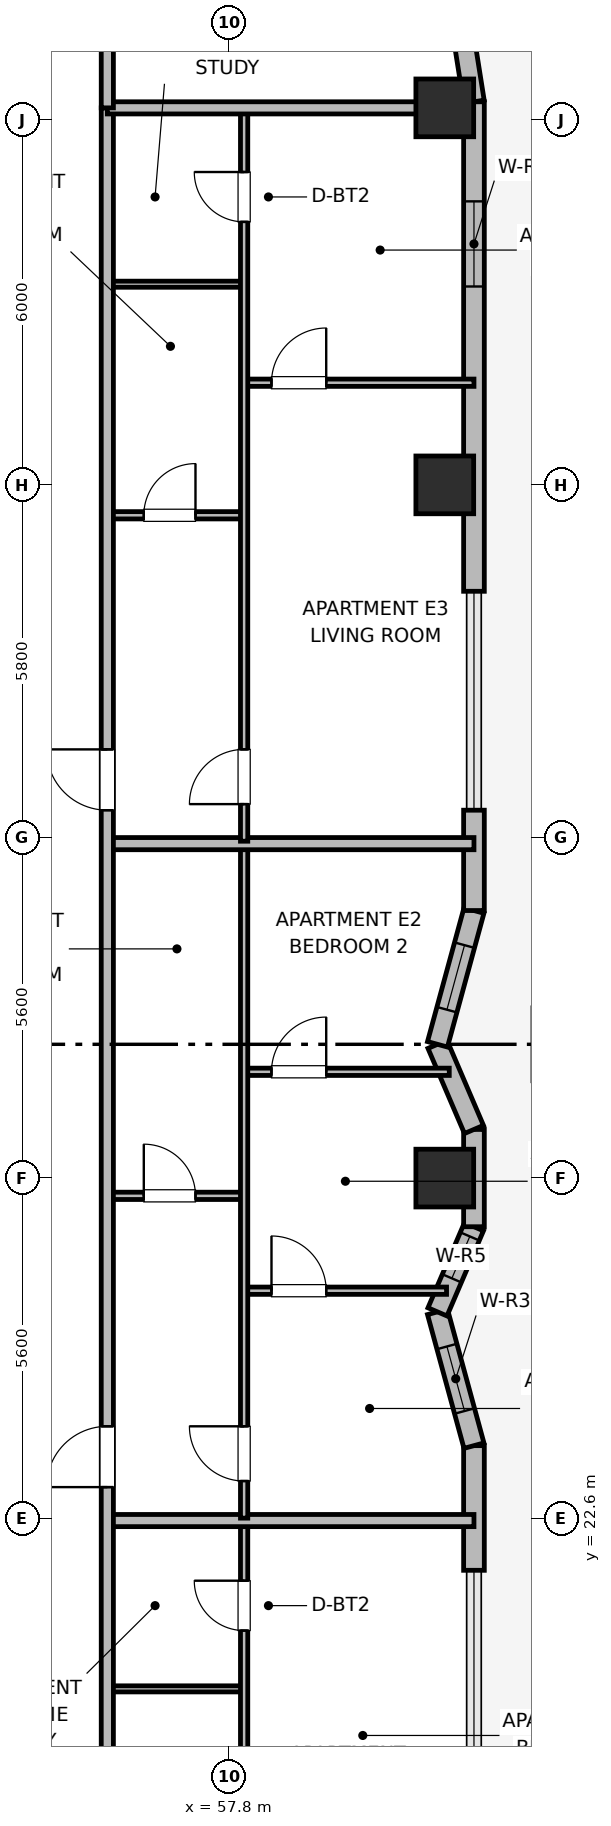
"""IFC4 building model, lengths in metres.
Left out: names, types, materials, properties, quantities, classifications, styles, units other than length and angle.
Written with IfcOpenShell. Run it as: python <this file> out.ifc"""

import sys

from ifc_helpers import new_model, si_unit, direction, frame, frame_2d, origin, origin_2d, place, context, subcontext, project, spatial, rectangle, extrude, element, fill, save


model = new_model("IFC4")
c1 = context("Model", 3, precision=1e-05, world=origin(), true_north=direction((0.0, 1.0)))
c2 = subcontext(c1, "Body", "Model", "MODEL_VIEW")
j1 = project(units=[si_unit("LENGTHUNIT", "METRE"), si_unit("PLANEANGLEUNIT", "RADIAN")], contexts=[c1])
p1 = place(None, origin())
s1 = spatial("IfcSite", under=j1, at=p1, CompositionType="ELEMENT")
p2 = place(p1, origin())
s2 = spatial("IfcBuilding", under=s1, at=p2, CompositionType="ELEMENT")
p3 = place(p2, frame((0.0, 0.0, 143.6)))
s3 = spatial("IfcBuildingStorey", under=s2, at=p3, CompositionType="ELEMENT", Elevation=143.6)
for number, where, z_axis, x_axis in (
    (1, (61.35, 28.2, 0.0), (0.0, 0.0, 1.0), (1.0, 0.0, 0.0)),
    (2, (61.35, 39.6, 0.0), (0.0, 0.0, 1.0), (1.0, 0.0, 0.0)),
    (3, (61.35, 45.8, 0.0), (0.0, 0.0, 1.0), (1.0, 0.0, 0.0)),
):
    element("IfcColumn", number, at=place(p3, frame(where, z_axis=z_axis, x_axis=x_axis)), inside=s3, PredefinedType="COLUMN", context=c2, shape_type="SweptSolid", body=[
        extrude(rectangle(XDim=0.95, YDim=0.95, at=origin_2d()), origin(), (0.0, 0.0, 1.0), 4.2),
    ])
p4 = place(p3, frame((61.83, 21.75, 0.0), z_axis=(0.0, 0.0, 1.0), x_axis=(0.0, 1.0, 0.0)))
e4 = element("IfcWall", 4, at=p4, inside=s3, PredefinedType="SOLIDWALL", context=c2, shape_type="SweptSolid", body=[
    extrude(rectangle(XDim=2.05, YDim=0.34, at=frame_2d((1.025, 0.0))), origin(), (0.0, 0.0, 1.0), 3.22),
])
p5 = place(p3, frame((61.83, 23.8, 0.0), z_axis=(0.0, 0.0, 1.0), x_axis=(-0.263162701705, 0.964751466665, 0.0)))
e5 = element("IfcWall", 5, at=p5, inside=s3, PredefinedType="SOLIDWALL", context=c2, shape_type="SweptSolid", body=[
    extrude(rectangle(XDim=2.28, YDim=0.34, at=frame_2d((1.14, 0.0))), origin(), (0.0, 0.0, 1.0), 3.22),
])
p6 = place(p5, frame((0.59, 0.0, 0.95)))
e6 = element("IfcOpeningElement", 6, at=p6, cuts=e5, PredefinedType="OPENING", context=c2, shape_type="SweptSolid", body=[
    extrude(rectangle(XDim=1.1, YDim=1.65, at=frame_2d((0.55, 0.825))), frame((0.0, 0.18, 0.0), z_axis=(0.0, -1.0, 0.0), x_axis=(1.0, 0.0, 0.0)), (0.0, 0.0, 1.0), 0.36),
])
p7 = place(p3, frame((61.23, 26.0, 0.0), z_axis=(0.0, 0.0, 1.0), x_axis=(0.39399667932, 0.919111862988, 0.0)))
e7 = element("IfcWall", 7, at=p7, inside=s3, PredefinedType="SOLIDWALL", context=c2, shape_type="SweptSolid", body=[
    extrude(rectangle(XDim=1.523, YDim=0.34, at=frame_2d((0.762, 0.0))), origin(), (0.0, 0.0, 1.0), 3.22),
])
p8 = place(p7, frame((0.6, 0.0, 0.95)))
e8 = element("IfcOpeningElement", 8, at=p8, cuts=e7, PredefinedType="OPENING", context=c2, shape_type="SweptSolid", body=[
    extrude(rectangle(XDim=0.75, YDim=1.65, at=frame_2d((0.375, 0.825))), frame((0.0, 0.18, 0.0), z_axis=(0.0, -1.0, 0.0), x_axis=(1.0, 0.0, 0.0)), (0.0, 0.0, 1.0), 0.36),
])
p9 = place(p3, frame((61.83, 27.4, 0.0), z_axis=(0.0, 0.0, 1.0), x_axis=(0.0, 1.0, 0.0)))
e9 = element("IfcWall", 9, at=p9, inside=s3, PredefinedType="SOLIDWALL", context=c2, shape_type="SweptSolid", body=[
    extrude(rectangle(XDim=1.6, YDim=0.34, at=frame_2d((0.8, 0.0))), origin(), (0.0, 0.0, 1.0), 3.22),
])
p10 = place(p3, frame((61.83, 29.0, 0.0), z_axis=(0.0, 0.0, 1.0), x_axis=(-0.39399667932, 0.919111862988, 0.0)))
e10 = element("IfcWall", 10, at=p10, inside=s3, PredefinedType="SOLIDWALL", context=c2, shape_type="SweptSolid", body=[
    extrude(rectangle(XDim=1.523, YDim=0.34, at=frame_2d((0.762, 0.0))), origin(), (0.0, 0.0, 1.0), 3.22),
])
p11 = place(p3, frame((61.23, 30.4, 0.0), z_axis=(0.0, 0.0, 1.0), x_axis=(0.263135522356, 0.964758880174, 0.0)))
e11 = element("IfcWall", 11, at=p11, inside=s3, PredefinedType="SOLIDWALL", context=c2, shape_type="SweptSolid", body=[
    extrude(rectangle(XDim=2.281, YDim=0.34, at=frame_2d((1.14, 0.0))), origin(), (0.0, 0.0, 1.0), 3.22),
])
p12 = place(p11, frame((0.59, 0.0, 0.95)))
e12 = element("IfcOpeningElement", 12, at=p12, cuts=e11, PredefinedType="OPENING", context=c2, shape_type="SweptSolid", body=[
    extrude(rectangle(XDim=1.1, YDim=1.65, at=frame_2d((0.55, 0.825))), frame((0.0, 0.18, 0.0), z_axis=(0.0, -1.0, 0.0), x_axis=(1.0, 0.0, 0.0)), (0.0, 0.0, 1.0), 0.36),
])
p13 = place(p3, frame((61.83, 32.6, 0.0), z_axis=(0.0, 0.0, 1.0), x_axis=(0.0, 1.0, 0.0)))
e13 = element("IfcWall", 13, at=p13, inside=s3, PredefinedType="SOLIDWALL", context=c2, shape_type="SweptSolid", body=[
    extrude(rectangle(XDim=1.65, YDim=0.34, at=frame_2d((0.825, 0.0))), origin(), (0.0, 0.0, 1.0), 3.22),
])
p14 = place(p3, frame((61.83, 37.85, 0.0), z_axis=(0.0, 0.0, 1.0), x_axis=(0.0, 1.0, 0.0)))
e14 = element("IfcWall", 14, at=p14, inside=s3, PredefinedType="SOLIDWALL", context=c2, shape_type="SweptSolid", body=[
    extrude(rectangle(XDim=8.05, YDim=0.34, at=frame_2d((4.025, 0.0))), origin(), (0.0, 0.0, 1.0), 3.22),
])
p15 = place(p14, frame((5.012, 0.0, 0.85)))
e15 = element("IfcOpeningElement", 15, at=p15, cuts=e14, PredefinedType="OPENING", context=c2, shape_type="SweptSolid", body=[
    extrude(rectangle(XDim=1.4, YDim=1.85, at=frame_2d((0.7, 0.925))), frame((0.0, 0.18, 0.0), z_axis=(0.0, -1.0, 0.0), x_axis=(1.0, 0.0, 0.0)), (0.0, 0.0, 1.0), 0.36),
])
p16 = place(p3, frame((61.83, 45.9, 0.0), z_axis=(0.0, 0.0, 1.0), x_axis=(-0.156481329164, 0.987680916907, 0.0)))
e16 = element("IfcWall", 16, at=p16, inside=s3, PredefinedType="SOLIDWALL", context=c2, shape_type="SweptSolid", body=[
    extrude(rectangle(XDim=1.136, YDim=0.34, at=frame_2d((0.568, 0.0))), origin(), (0.0, 0.0, 1.0), 3.22),
])
p17 = place(p3, frame((55.8, 19.8, 0.0), z_axis=(0.0, 0.0, 1.0), x_axis=(1.0, 0.0, 0.0)))
e17 = element("IfcWall", 17, at=p17, inside=s3, PredefinedType="PARTITIONING", context=c2, shape_type="SweptSolid", body=[
    extrude(rectangle(XDim=2.25, YDim=0.1, at=frame_2d((1.125, 0.0))), origin(), (0.0, 0.0, 1.0), 3.05),
])
p18 = place(p3, frame((58.05, 10.64, 0.0), z_axis=(0.0, 0.0, 1.0), x_axis=(0.0, 1.0, 0.0)))
e18 = element("IfcWall", 18, at=p18, inside=s3, PredefinedType="PARTITIONING", context=c2, shape_type="SweptSolid", body=[
    extrude(rectangle(XDim=11.888, YDim=0.12, at=frame_2d((5.944, 0.0))), origin(), (0.0, 0.0, 1.0), 3.05),
])
p19 = place(p18, frame((0.41, 0.0, 0.0)))
e19 = element("IfcOpeningElement", 19, at=p19, cuts=e18, PredefinedType="OPENING", context=c2, shape_type="SweptSolid", body=[
    extrude(rectangle(XDim=0.9, YDim=2.1, at=frame_2d((0.45, 1.05))), frame((0.0, 0.07, 0.0), z_axis=(0.0, -1.0, 0.0), x_axis=(1.0, 0.0, 0.0)), (0.0, 0.0, 1.0), 0.14),
])
p20 = place(p18, frame((10.119, 0.0, 0.0)))
e20 = element("IfcOpeningElement", 20, at=p20, cuts=e18, PredefinedType="OPENING", context=c2, shape_type="SweptSolid", body=[
    extrude(rectangle(XDim=0.82, YDim=2.08, at=frame_2d((0.41, 1.04))), frame((0.0, 0.07, 0.0), z_axis=(0.0, -1.0, 0.0), x_axis=(1.0, 0.0, 0.0)), (0.0, 0.0, 1.0), 0.14),
])
p21 = place(p3, frame((55.8, 22.568, 0.0), z_axis=(0.0, 0.0, 1.0), x_axis=(1.0, 0.0, 0.0)))
e21 = element("IfcWall", 21, at=p21, inside=s3, PredefinedType="PARTITIONING", context=c2, shape_type="SweptSolid", body=[
    extrude(rectangle(XDim=6.03, YDim=0.2, at=frame_2d((3.015, 0.0))), origin(), (0.0, 0.0, 1.0), 3.05),
])
p22 = place(p3, frame((55.8, 27.908, 0.0), z_axis=(0.0, 0.0, 1.0), x_axis=(1.0, 0.0, 0.0)))
e22 = element("IfcWall", 22, at=p22, inside=s3, PredefinedType="PARTITIONING", context=c2, shape_type="SweptSolid", body=[
    extrude(rectangle(XDim=2.25, YDim=0.12, at=frame_2d((1.125, 0.0))), origin(), (0.0, 0.0, 1.0), 3.05),
])
p23 = place(p22, frame((0.6, 0.0, 0.0)))
e23 = element("IfcOpeningElement", 23, at=p23, cuts=e22, PredefinedType="OPENING", context=c2, shape_type="SweptSolid", body=[
    extrude(rectangle(XDim=0.85, YDim=2.1, at=frame_2d((0.425, 1.05))), frame((0.0, 0.07, 0.0), z_axis=(0.0, -1.0, 0.0), x_axis=(1.0, 0.0, 0.0)), (0.0, 0.0, 1.0), 0.14),
])
p24 = place(p3, frame((58.05, 26.348, 0.0), z_axis=(0.0, 0.0, 1.0), x_axis=(1.0, 0.0, 0.0)))
e24 = element("IfcWall", 24, at=p24, inside=s3, PredefinedType="PARTITIONING", context=c2, shape_type="SweptSolid", body=[
    extrude(rectangle(XDim=3.329, YDim=0.12, at=frame_2d((1.665, 0.0))), origin(), (0.0, 0.0, 1.0), 3.05),
])
p25 = place(p24, frame((0.45, 0.0, 0.0)))
e25 = element("IfcOpeningElement", 25, at=p25, cuts=e24, PredefinedType="OPENING", context=c2, shape_type="SweptSolid", body=[
    extrude(rectangle(XDim=0.9, YDim=2.1, at=frame_2d((0.45, 1.05))), frame((0.0, 0.07, 0.0), z_axis=(0.0, -1.0, 0.0), x_axis=(1.0, 0.0, 0.0)), (0.0, 0.0, 1.0), 0.14),
])
p26 = place(p3, frame((58.05, 29.948, 0.0), z_axis=(0.0, 0.0, 1.0), x_axis=(1.0, 0.0, 0.0)))
e26 = element("IfcWall", 26, at=p26, inside=s3, PredefinedType="PARTITIONING", context=c2, shape_type="SweptSolid", body=[
    extrude(rectangle(XDim=3.374, YDim=0.12, at=frame_2d((1.687, 0.0))), origin(), (0.0, 0.0, 1.0), 3.05),
])
p27 = place(p26, frame((0.45, 0.0, 0.0)))
e27 = element("IfcOpeningElement", 27, at=p27, cuts=e26, PredefinedType="OPENING", context=c2, shape_type="SweptSolid", body=[
    extrude(rectangle(XDim=0.9, YDim=2.1, at=frame_2d((0.45, 1.05))), frame((0.0, 0.07, 0.0), z_axis=(0.0, -1.0, 0.0), x_axis=(1.0, 0.0, 0.0)), (0.0, 0.0, 1.0), 0.14),
])
p28 = place(p3, frame((58.05, 22.608, 0.0), z_axis=(0.0, 0.0, 1.0), x_axis=(0.0, 1.0, 0.0)))
e28 = element("IfcWall", 28, at=p28, inside=s3, PredefinedType="PARTITIONING", context=c2, shape_type="SweptSolid", body=[
    extrude(rectangle(XDim=11.052, YDim=0.12, at=frame_2d((5.526, 0.0))), origin(), (0.0, 0.0, 1.0), 3.05),
])
p29 = place(p28, frame((0.61, 0.0, 0.0)))
e29 = element("IfcOpeningElement", 29, at=p29, cuts=e28, PredefinedType="OPENING", context=c2, shape_type="SweptSolid", body=[
    extrude(rectangle(XDim=0.9, YDim=2.1, at=frame_2d((0.45, 1.05))), frame((0.0, 0.07, 0.0), z_axis=(0.0, -1.0, 0.0), x_axis=(1.0, 0.0, 0.0)), (0.0, 0.0, 1.0), 0.14),
])
p30 = place(p3, frame((55.8, 33.7, 0.0), z_axis=(0.0, 0.0, 1.0), x_axis=(1.0, 0.0, 0.0)))
e30 = element("IfcWall", 30, at=p30, inside=s3, PredefinedType="PARTITIONING", context=c2, shape_type="SweptSolid", body=[
    extrude(rectangle(XDim=6.03, YDim=0.2, at=frame_2d((3.015, 0.0))), origin(), (0.0, 0.0, 1.0), 3.05),
])
p31 = place(p3, frame((55.8, 39.1, 0.0), z_axis=(0.0, 0.0, 1.0), x_axis=(1.0, 0.0, 0.0)))
e31 = element("IfcWall", 31, at=p31, inside=s3, PredefinedType="PARTITIONING", context=c2, shape_type="SweptSolid", body=[
    extrude(rectangle(XDim=2.25, YDim=0.12, at=frame_2d((1.125, 0.0))), origin(), (0.0, 0.0, 1.0), 3.05),
])
p32 = place(p31, frame((0.6, 0.0, 0.0)))
e32 = element("IfcOpeningElement", 32, at=p32, cuts=e31, PredefinedType="OPENING", context=c2, shape_type="SweptSolid", body=[
    extrude(rectangle(XDim=0.85, YDim=2.1, at=frame_2d((0.425, 1.05))), frame((0.0, 0.07, 0.0), z_axis=(0.0, -1.0, 0.0), x_axis=(1.0, 0.0, 0.0)), (0.0, 0.0, 1.0), 0.14),
])
p33 = place(p3, frame((55.8, 42.9, 0.0), z_axis=(0.0, 0.0, 1.0), x_axis=(1.0, 0.0, 0.0)))
e33 = element("IfcWall", 33, at=p33, inside=s3, PredefinedType="PARTITIONING", context=c2, shape_type="SweptSolid", body=[
    extrude(rectangle(XDim=2.25, YDim=0.1, at=frame_2d((1.125, 0.0))), origin(), (0.0, 0.0, 1.0), 3.05),
])
p34 = place(p3, frame((58.05, 41.28, 0.0), z_axis=(0.0, 0.0, 1.0), x_axis=(1.0, 0.0, 0.0)))
e34 = element("IfcWall", 34, at=p34, inside=s3, PredefinedType="PARTITIONING", context=c2, shape_type="SweptSolid", body=[
    extrude(rectangle(XDim=3.78, YDim=0.12, at=frame_2d((1.89, 0.0))), origin(), (0.0, 0.0, 1.0), 3.05),
])
p35 = place(p34, frame((0.45, 0.0, 0.0)))
e35 = element("IfcOpeningElement", 35, at=p35, cuts=e34, PredefinedType="OPENING", context=c2, shape_type="SweptSolid", body=[
    extrude(rectangle(XDim=0.9, YDim=2.1, at=frame_2d((0.45, 1.05))), frame((0.0, 0.07, 0.0), z_axis=(0.0, -1.0, 0.0), x_axis=(1.0, 0.0, 0.0)), (0.0, 0.0, 1.0), 0.14),
])
p36 = place(p3, frame((58.05, 33.74, 0.0), z_axis=(0.0, 0.0, 1.0), x_axis=(0.0, 1.0, 0.0)))
e36 = element("IfcWall", 36, at=p36, inside=s3, PredefinedType="PARTITIONING", context=c2, shape_type="SweptSolid", body=[
    extrude(rectangle(XDim=12.02, YDim=0.12, at=frame_2d((6.01, 0.0))), origin(), (0.0, 0.0, 1.0), 3.05),
])
p37 = place(p36, frame((0.61, 0.0, 0.0)))
e37 = element("IfcOpeningElement", 37, at=p37, cuts=e36, PredefinedType="OPENING", context=c2, shape_type="SweptSolid", body=[
    extrude(rectangle(XDim=0.9, YDim=2.1, at=frame_2d((0.45, 1.05))), frame((0.0, 0.07, 0.0), z_axis=(0.0, -1.0, 0.0), x_axis=(1.0, 0.0, 0.0)), (0.0, 0.0, 1.0), 0.14),
])
p38 = place(p36, frame((10.185, 0.0, 0.0)))
e38 = element("IfcOpeningElement", 38, at=p38, cuts=e36, PredefinedType="OPENING", context=c2, shape_type="SweptSolid", body=[
    extrude(rectangle(XDim=0.82, YDim=2.08, at=frame_2d((0.41, 1.04))), frame((0.0, 0.07, 0.0), z_axis=(0.0, -1.0, 0.0), x_axis=(1.0, 0.0, 0.0)), (0.0, 0.0, 1.0), 0.14),
])
p39 = place(p3, frame((55.8, 10.6, 0.0), z_axis=(0.0, 0.0, 1.0), x_axis=(0.0, 1.0, 0.0)))
e39 = element("IfcWall", 39, at=p39, inside=s3, PredefinedType="PARTITIONING", context=c2, shape_type="SweptSolid", body=[
    extrude(rectangle(XDim=35.2, YDim=0.2, at=frame_2d((17.6, 0.0))), origin(), (0.0, 0.0, 1.0), 3.05),
])
p40 = place(p39, frame((2.65, 0.0, 0.0)))
e40 = element("IfcOpeningElement", 40, at=p40, cuts=e39, PredefinedType="OPENING", context=c2, shape_type="SweptSolid", body=[
    extrude(rectangle(XDim=1.0, YDim=2.15, at=frame_2d((0.5, 1.075))), frame((0.0, 0.11, 0.0), z_axis=(0.0, -1.0, 0.0), x_axis=(1.0, 0.0, 0.0)), (0.0, 0.0, 1.0), 0.22),
])
p41 = place(p39, frame((12.518, 0.0, 0.0)))
e41 = element("IfcOpeningElement", 41, at=p41, cuts=e39, PredefinedType="OPENING", context=c2, shape_type="SweptSolid", body=[
    extrude(rectangle(XDim=1.0, YDim=2.15, at=frame_2d((0.5, 1.075))), frame((0.0, 0.11, 0.0), z_axis=(0.0, -1.0, 0.0), x_axis=(1.0, 0.0, 0.0)), (0.0, 0.0, 1.0), 0.22),
])
p42 = place(p39, frame((23.65, 0.0, 0.0)))
e42 = element("IfcOpeningElement", 42, at=p42, cuts=e39, PredefinedType="OPENING", context=c2, shape_type="SweptSolid", body=[
    extrude(rectangle(XDim=1.0, YDim=2.15, at=frame_2d((0.5, 1.075))), frame((0.0, 0.11, 0.0), z_axis=(0.0, -1.0, 0.0), x_axis=(1.0, 0.0, 0.0)), (0.0, 0.0, 1.0), 0.22),
])
p43 = place(p3, frame((55.8, 45.8, 0.0), z_axis=(0.0, 0.0, 1.0), x_axis=(1.0, 0.0, 0.0)))
e43 = element("IfcWall", 43, at=p43, inside=s3, PredefinedType="PARTITIONING", context=c2, shape_type="SweptSolid", body=[
    extrude(rectangle(XDim=5.61, YDim=0.2, at=frame_2d((2.805, 0.0))), origin(), (0.0, 0.0, 1.0), 3.05),
])
p44 = place(p3, frame((55.8, 45.8, 0.0), z_axis=(0.0, 0.0, 1.0), x_axis=(0.0, 1.0, 0.0)))
e44 = element("IfcWall", 44, at=p44, inside=s3, PredefinedType="PARTITIONING", context=c2, shape_type="SweptSolid", body=[
    extrude(rectangle(XDim=3.73, YDim=0.2, at=frame_2d((1.865, 0.0))), origin(), (0.0, 0.0, 1.0), 3.05),
])
p45 = place(p6, origin())
e45 = element("IfcWindow", 45, at=p45, inside=s3, PartitioningType="SINGLE_PANEL", PredefinedType="WINDOW", context=c2, shape_type="SweptSolid", body=[
    extrude(rectangle(XDim=1.1, YDim=1.65, at=frame_2d((0.55, 0.825))), frame((0.0, 0.03, 0.0), z_axis=(0.0, -1.0, 0.0), x_axis=(1.0, 0.0, 0.0)), (0.0, 0.0, 1.0), 0.06),
])
fill(e6, e45)
p46 = place(p8, origin())
e46 = element("IfcWindow", 46, at=p46, inside=s3, PartitioningType="SINGLE_PANEL", PredefinedType="WINDOW", context=c2, shape_type="SweptSolid", body=[
    extrude(rectangle(XDim=0.75, YDim=1.65, at=frame_2d((0.375, 0.825))), frame((0.0, 0.03, 0.0), z_axis=(0.0, -1.0, 0.0), x_axis=(1.0, 0.0, 0.0)), (0.0, 0.0, 1.0), 0.06),
])
fill(e8, e46)
p47 = place(p12, origin())
e47 = element("IfcWindow", 47, at=p47, inside=s3, PartitioningType="SINGLE_PANEL", PredefinedType="WINDOW", context=c2, shape_type="SweptSolid", body=[
    extrude(rectangle(XDim=1.1, YDim=1.65, at=frame_2d((0.55, 0.825))), frame((0.0, 0.03, 0.0), z_axis=(0.0, -1.0, 0.0), x_axis=(1.0, 0.0, 0.0)), (0.0, 0.0, 1.0), 0.06),
])
fill(e12, e47)
p48 = place(p15, origin())
e48 = element("IfcWindow", 48, at=p48, inside=s3, PartitioningType="SINGLE_PANEL", PredefinedType="WINDOW", context=c2, shape_type="SweptSolid", body=[
    extrude(rectangle(XDim=1.4, YDim=1.85, at=frame_2d((0.7, 0.925))), frame((0.0, 0.03, 0.0), z_axis=(0.0, -1.0, 0.0), x_axis=(1.0, 0.0, 0.0)), (0.0, 0.0, 1.0), 0.06),
])
fill(e15, e48)
p49 = place(p20, origin())
e49 = element("IfcDoor", 49, at=p49, inside=s3, OperationType="SINGLE_SWING_RIGHT", PredefinedType="DOOR", context=c2, shape_type="SweptSolid", body=[
    extrude(rectangle(XDim=0.82, YDim=2.08, at=frame_2d((0.41, 1.04))), frame((0.0, 0.025, 0.0), z_axis=(0.0, -1.0, 0.0), x_axis=(1.0, 0.0, 0.0)), (0.0, 0.0, 1.0), 0.05),
])
fill(e20, e49)
p50 = place(p23, origin())
e50 = element("IfcDoor", 50, at=p50, inside=s3, OperationType="SINGLE_SWING_LEFT", PredefinedType="DOOR", context=c2, shape_type="SweptSolid", body=[
    extrude(rectangle(XDim=0.85, YDim=2.1, at=frame_2d((0.425, 1.05))), frame((0.0, 0.025, 0.0), z_axis=(0.0, -1.0, 0.0), x_axis=(1.0, 0.0, 0.0)), (0.0, 0.0, 1.0), 0.05),
])
fill(e23, e50)
p51 = place(p25, origin())
e51 = element("IfcDoor", 51, at=p51, inside=s3, OperationType="SINGLE_SWING_LEFT", PredefinedType="DOOR", context=c2, shape_type="SweptSolid", body=[
    extrude(rectangle(XDim=0.9, YDim=2.1, at=frame_2d((0.45, 1.05))), frame((0.0, 0.025, 0.0), z_axis=(0.0, -1.0, 0.0), x_axis=(1.0, 0.0, 0.0)), (0.0, 0.0, 1.0), 0.05),
])
fill(e25, e51)
p52 = place(p27, origin())
e52 = element("IfcDoor", 52, at=p52, inside=s3, OperationType="SINGLE_SWING_RIGHT", PredefinedType="DOOR", context=c2, shape_type="SweptSolid", body=[
    extrude(rectangle(XDim=0.9, YDim=2.1, at=frame_2d((0.45, 1.05))), frame((0.0, 0.025, 0.0), z_axis=(0.0, -1.0, 0.0), x_axis=(1.0, 0.0, 0.0)), (0.0, 0.0, 1.0), 0.05),
])
fill(e27, e52)
p53 = place(p29, origin())
e53 = element("IfcDoor", 53, at=p53, inside=s3, OperationType="SINGLE_SWING_RIGHT", PredefinedType="DOOR", context=c2, shape_type="SweptSolid", body=[
    extrude(rectangle(XDim=0.9, YDim=2.1, at=frame_2d((0.45, 1.05))), frame((0.0, 0.025, 0.0), z_axis=(0.0, -1.0, 0.0), x_axis=(1.0, 0.0, 0.0)), (0.0, 0.0, 1.0), 0.05),
])
fill(e29, e53)
p54 = place(p32, origin())
e54 = element("IfcDoor", 54, at=p54, inside=s3, OperationType="SINGLE_SWING_RIGHT", PredefinedType="DOOR", context=c2, shape_type="SweptSolid", body=[
    extrude(rectangle(XDim=0.85, YDim=2.1, at=frame_2d((0.425, 1.05))), frame((0.0, 0.025, 0.0), z_axis=(0.0, -1.0, 0.0), x_axis=(1.0, 0.0, 0.0)), (0.0, 0.0, 1.0), 0.05),
])
fill(e32, e54)
p55 = place(p35, origin())
e55 = element("IfcDoor", 55, at=p55, inside=s3, OperationType="SINGLE_SWING_RIGHT", PredefinedType="DOOR", context=c2, shape_type="SweptSolid", body=[
    extrude(rectangle(XDim=0.9, YDim=2.1, at=frame_2d((0.45, 1.05))), frame((0.0, 0.025, 0.0), z_axis=(0.0, -1.0, 0.0), x_axis=(1.0, 0.0, 0.0)), (0.0, 0.0, 1.0), 0.05),
])
fill(e35, e55)
p56 = place(p37, origin())
e56 = element("IfcDoor", 56, at=p56, inside=s3, OperationType="SINGLE_SWING_LEFT", PredefinedType="DOOR", context=c2, shape_type="SweptSolid", body=[
    extrude(rectangle(XDim=0.9, YDim=2.1, at=frame_2d((0.45, 1.05))), frame((0.0, 0.025, 0.0), z_axis=(0.0, -1.0, 0.0), x_axis=(1.0, 0.0, 0.0)), (0.0, 0.0, 1.0), 0.05),
])
fill(e37, e56)
p57 = place(p38, origin())
e57 = element("IfcDoor", 57, at=p57, inside=s3, OperationType="SINGLE_SWING_RIGHT", PredefinedType="DOOR", context=c2, shape_type="SweptSolid", body=[
    extrude(rectangle(XDim=0.82, YDim=2.08, at=frame_2d((0.41, 1.04))), frame((0.0, 0.025, 0.0), z_axis=(0.0, -1.0, 0.0), x_axis=(1.0, 0.0, 0.0)), (0.0, 0.0, 1.0), 0.05),
])
fill(e38, e57)
p58 = place(p41, origin())
e58 = element("IfcDoor", 58, at=p58, inside=s3, OperationType="SINGLE_SWING_LEFT", PredefinedType="DOOR", context=c2, shape_type="SweptSolid", body=[
    extrude(rectangle(XDim=1.0, YDim=2.15, at=frame_2d((0.5, 1.075))), frame((0.0, 0.025, 0.0), z_axis=(0.0, -1.0, 0.0), x_axis=(1.0, 0.0, 0.0)), (0.0, 0.0, 1.0), 0.05),
])
fill(e41, e58)
p59 = place(p42, origin())
e59 = element("IfcDoor", 59, at=p59, inside=s3, OperationType="SINGLE_SWING_RIGHT", PredefinedType="DOOR", context=c2, shape_type="SweptSolid", body=[
    extrude(rectangle(XDim=1.0, YDim=2.15, at=frame_2d((0.5, 1.075))), frame((0.0, 0.025, 0.0), z_axis=(0.0, -1.0, 0.0), x_axis=(1.0, 0.0, 0.0)), (0.0, 0.0, 1.0), 0.05),
])
fill(e42, e59)
save(model, sys.argv[1])
